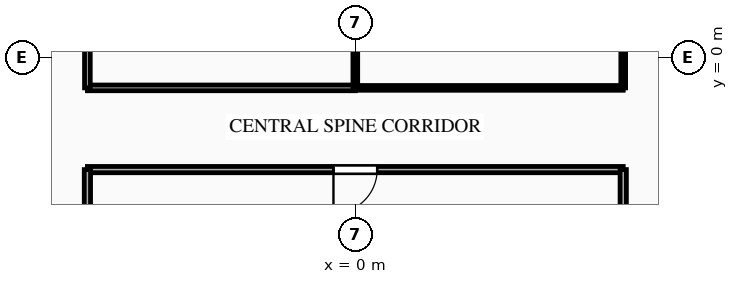
"""IFC4 building model, lengths in metres.
Left out: names, types, materials, properties, quantities, classifications, styles, units other than length and angle.
Written with IfcOpenShell. Run it as: python <this file> out.ifc"""

import sys

from ifc_helpers import new_model, si_unit, direction, frame, frame_2d, origin, place, context, subcontext, project, spatial, rectangle, extrude, element, fill, save


model = new_model("IFC4")
c1 = context("Model", 3, precision=1e-05, world=origin(), true_north=direction((0.0, 1.0)))
c2 = subcontext(c1, "Body", "Model", "MODEL_VIEW")
j1 = project(units=[si_unit("LENGTHUNIT", "METRE"), si_unit("PLANEANGLEUNIT", "RADIAN")], contexts=[c1])
p1 = place(None, origin())
s1 = spatial("IfcSite", under=j1, at=p1, CompositionType="ELEMENT")
p2 = place(p1, origin())
s2 = spatial("IfcBuilding", under=s1, at=p2, CompositionType="ELEMENT")
p3 = place(p2, frame((0.0, 0.0, 141.05)))
s3 = spatial("IfcBuildingStorey", under=s2, at=p3, CompositionType="ELEMENT", Elevation=141.05)
p4 = place(p3, frame((-7.05, -0.8, 0.0), z_axis=(0.0, 0.0, 1.0), x_axis=(1.0, 0.0, 0.0)))
e1 = element("IfcWall", 1, at=p4, inside=s3, PredefinedType="PARTITIONING", context=c2, shape_type="SweptSolid", body=[
    extrude(rectangle(XDim=7.05, YDim=0.15, at=frame_2d((3.525, 0.0))), origin(), (0.0, 0.0, 1.0), 3.04),
])
p5 = place(p3, frame((0.0, -0.8, 0.0), z_axis=(0.0, 0.0, 1.0), x_axis=(1.0, 0.0, 0.0)))
e2 = element("IfcWall", 2, at=p5, inside=s3, PredefinedType="PARTITIONING", context=c2, shape_type="SweptSolid", body=[
    extrude(rectangle(XDim=7.05, YDim=0.125, at=frame_2d((3.525, 0.0))), origin(), (0.0, 0.0, 1.0), 3.04),
])
p6 = place(p3, frame((7.05, -2.95, 0.0), z_axis=(0.0, 0.0, 1.0), x_axis=(-1.0, 0.0, 0.0)))
e3 = element("IfcWall", 3, at=p6, inside=s3, PredefinedType="PARTITIONING", context=c2, shape_type="SweptSolid", body=[
    extrude(rectangle(XDim=14.1, YDim=0.165, at=frame_2d((7.05, 0.0))), origin(), (0.0, 0.0, 1.0), 3.04),
])
p7 = place(p6, frame((6.475, 0.0, 0.0)))
e4 = element("IfcOpeningElement", 4, at=p7, cuts=e3, PredefinedType="OPENING", context=c2, shape_type="SweptSolid", body=[
    extrude(rectangle(XDim=1.15, YDim=2.15, at=frame_2d((0.575, 1.075))), frame((0.0, 0.093, 0.0), z_axis=(0.0, -1.0, 0.0), x_axis=(1.0, 0.0, 0.0)), (0.0, 0.0, 1.0), 0.185),
])
p8 = place(p3, frame((-7.05, 8.5, 0.0), z_axis=(0.0, 0.0, 1.0), x_axis=(0.0, -1.0, 0.0)))
e5 = element("IfcWall", 5, at=p8, inside=s3, PredefinedType="PARTITIONING", context=c2, shape_type="SweptSolid", body=[
    extrude(rectangle(XDim=9.3, YDim=0.15, at=frame_2d((4.65, 0.0))), origin(), (0.0, 0.0, 1.0), 3.04),
])
p9 = place(p8, frame((6.784, 0.0, 0.0)))
e6 = element("IfcOpeningElement", 6, at=p9, cuts=e5, PredefinedType="OPENING", context=c2, shape_type="SweptSolid", body=[
    extrude(rectangle(XDim=1.05, YDim=2.15, at=frame_2d((0.525, 1.075))), frame((0.0, 0.085, 0.0), z_axis=(0.0, -1.0, 0.0), x_axis=(1.0, 0.0, 0.0)), (0.0, 0.0, 1.0), 0.17),
])
p10 = place(p3, frame((-7.05, -2.95, 0.0), z_axis=(0.0, 0.0, 1.0), x_axis=(0.0, -1.0, 0.0)))
e7 = element("IfcWall", 7, at=p10, inside=s3, PredefinedType="PARTITIONING", context=c2, shape_type="SweptSolid", body=[
    extrude(rectangle(XDim=2.65, YDim=0.165, at=frame_2d((1.325, 0.0))), origin(), (0.0, 0.0, 1.0), 3.04),
])
p11 = place(p3, frame((7.05, -0.8, 0.0), z_axis=(0.0, 0.0, 1.0), x_axis=(0.0, 1.0, 0.0)))
e8 = element("IfcWall", 8, at=p11, inside=s3, PredefinedType="PARTITIONING", context=c2, shape_type="SweptSolid", body=[
    extrude(rectangle(XDim=9.3, YDim=0.125, at=frame_2d((4.65, 0.0))), origin(), (0.0, 0.0, 1.0), 3.04),
])
p12 = place(p11, frame((1.479, 0.0, 0.0)))
e9 = element("IfcOpeningElement", 9, at=p12, cuts=e8, PredefinedType="OPENING", context=c2, shape_type="SweptSolid", body=[
    extrude(rectangle(XDim=0.95, YDim=2.1, at=frame_2d((0.475, 1.05))), frame((0.0, 0.073, 0.0), z_axis=(0.0, -1.0, 0.0), x_axis=(1.0, 0.0, 0.0)), (0.0, 0.0, 1.0), 0.145),
])
p13 = place(p3, frame((7.05, -5.6, 0.0), z_axis=(0.0, 0.0, 1.0), x_axis=(0.0, 1.0, 0.0)))
e10 = element("IfcWall", 10, at=p13, inside=s3, PredefinedType="PARTITIONING", context=c2, shape_type="SweptSolid", body=[
    extrude(rectangle(XDim=2.65, YDim=0.165, at=frame_2d((1.325, 0.0))), origin(), (0.0, 0.0, 1.0), 3.04),
])
p14 = place(p3, frame((0.0, 8.5, 0.0), z_axis=(0.0, 0.0, 1.0), x_axis=(0.0, -1.0, 0.0)))
e11 = element("IfcWall", 11, at=p14, inside=s3, PredefinedType="PARTITIONING", context=c2, shape_type="SweptSolid", body=[
    extrude(rectangle(XDim=9.3, YDim=0.125, at=frame_2d((4.65, 0.0))), origin(), (0.0, 0.0, 1.0), 3.04),
])
p15 = place(p7, origin())
e12 = element("IfcDoor", 12, at=p15, inside=s3, OperationType="SINGLE_SWING_RIGHT", PredefinedType="DOOR", context=c2, shape_type="SweptSolid", body=[
    extrude(rectangle(XDim=1.15, YDim=2.15, at=frame_2d((0.575, 1.075))), frame((0.0, 0.025, 0.0), z_axis=(0.0, -1.0, 0.0), x_axis=(1.0, 0.0, 0.0)), (0.0, 0.0, 1.0), 0.05),
])
fill(e4, e12)
save(model, sys.argv[1])
